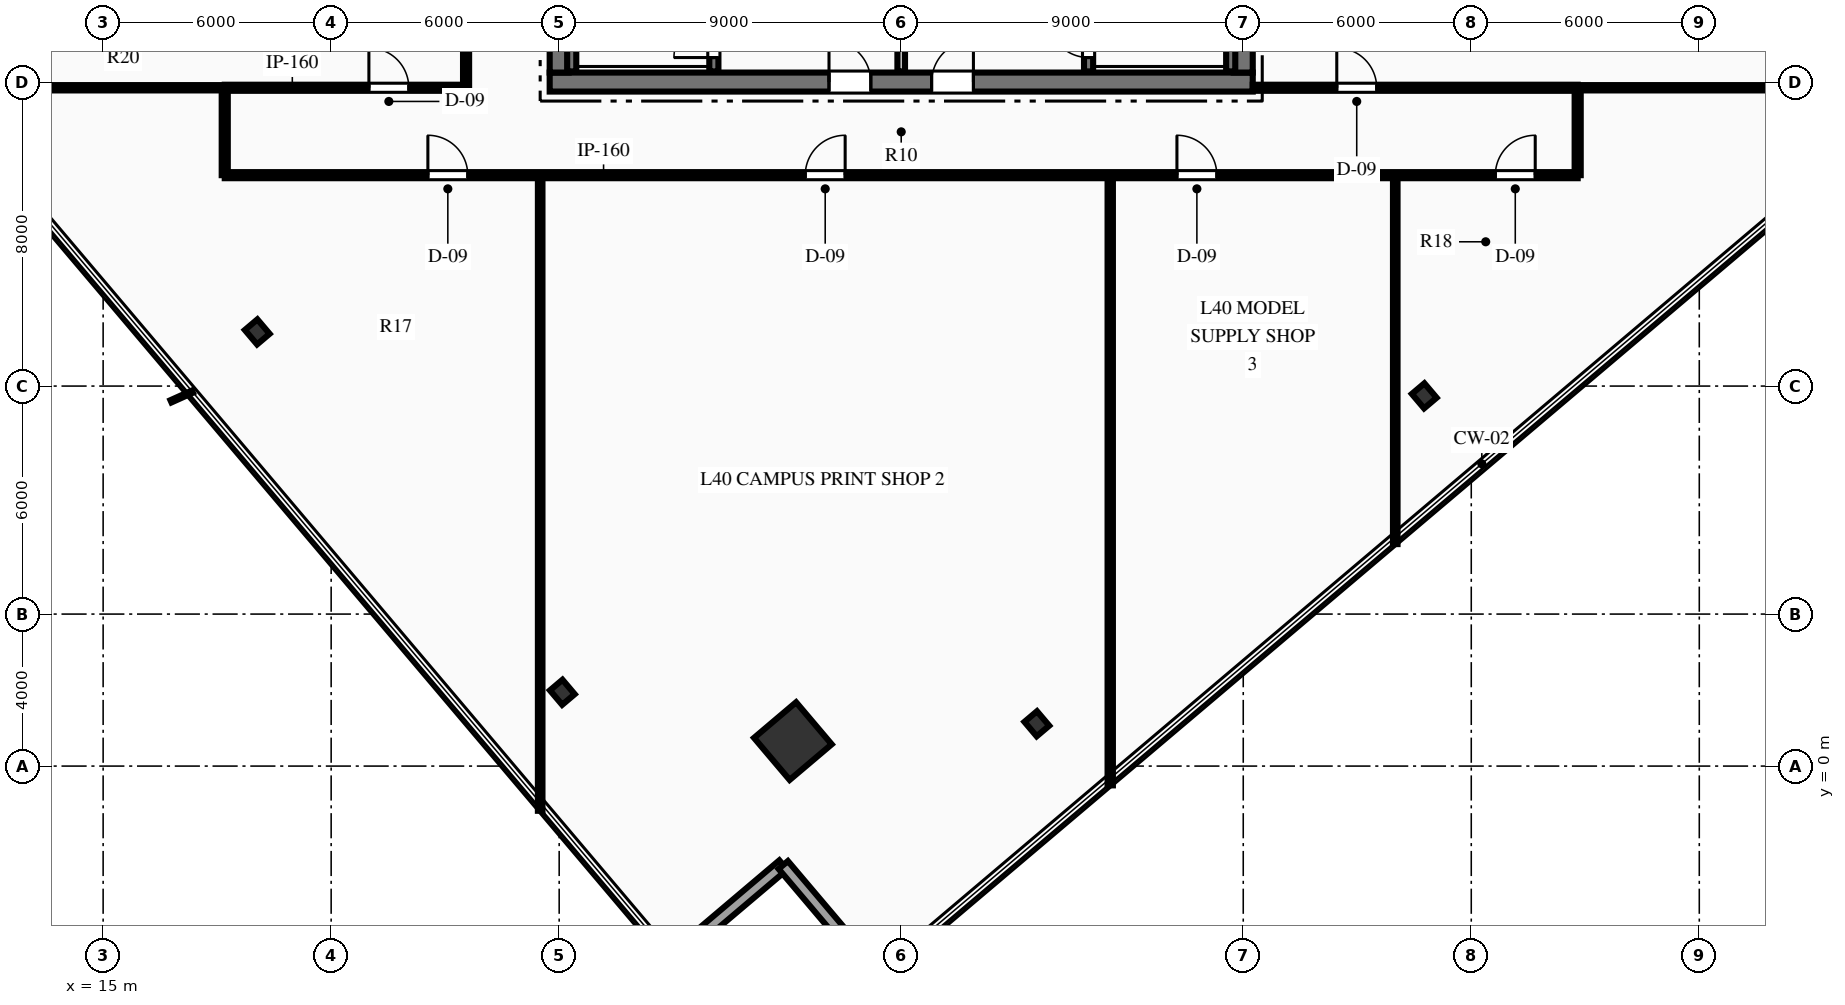
"""IFC4 building model, lengths in metres.
Left out: names, types, materials, properties, quantities, classifications, styles, units other than length and angle.
Written with IfcOpenShell. Run it as: python <this file> out.ifc"""

import sys

from ifc_helpers import new_model, si_unit, direction, frame, frame_2d, origin, origin_2d, place, context, subcontext, project, spatial, rectangle, hollow_rectangle, i_section, extrude, element, fill, save


model = new_model("IFC4")
c1 = context("Model", 3, precision=1e-05, world=origin(), true_north=direction((0.0, 1.0)))
c2 = subcontext(c1, "Body", "Model", "MODEL_VIEW")
j1 = project(units=[si_unit("LENGTHUNIT", "METRE"), si_unit("PLANEANGLEUNIT", "RADIAN")], contexts=[c1])
p1 = place(None, origin())
s1 = spatial("IfcSite", under=j1, at=p1, CompositionType="ELEMENT")
p2 = place(p1, origin())
s2 = spatial("IfcBuilding", under=s1, at=p2, CompositionType="ELEMENT")
p3 = place(p2, frame((0.0, 0.0, 163.2)))
s3 = spatial("IfcBuildingStorey", under=s2, at=p3, CompositionType="ELEMENT", Elevation=163.2)
p4 = place(p3, frame((26.75, 18.0, 0.0), z_axis=(0.0, 0.0, 1.0), x_axis=(1.0, 0.0, 0.0)))
e1 = element("IfcWall", 1, at=p4, inside=s3, PredefinedType="SHEAR", context=c2, shape_type="SweptSolid", body=[
    extrude(rectangle(XDim=18.5, YDim=0.5, at=frame_2d((9.25, 0.0))), origin(), (0.0, 0.0, 1.0), 3.75),
])
p5 = place(p4, frame((7.35, 0.0, 0.0)))
e2 = element("IfcOpeningElement", 2, at=p5, cuts=e1, PredefinedType="OPENING", context=c2, shape_type="SweptSolid", body=[
    extrude(rectangle(XDim=1.1, YDim=2.15, at=frame_2d((0.55, 1.075))), frame((0.0, 0.26, 0.0), z_axis=(0.0, -1.0, 0.0), x_axis=(1.0, 0.0, 0.0)), (0.0, 0.0, 1.0), 0.52),
])
p6 = place(p4, frame((10.05, 0.0, 0.0)))
e3 = element("IfcOpeningElement", 3, at=p6, cuts=e1, PredefinedType="OPENING", context=c2, shape_type="SweptSolid", body=[
    extrude(rectangle(XDim=1.1, YDim=2.15, at=frame_2d((0.55, 1.075))), frame((0.0, 0.26, 0.0), z_axis=(0.0, -1.0, 0.0), x_axis=(1.0, 0.0, 0.0)), (0.0, 0.0, 1.0), 0.52),
])
p7 = place(p3, frame((27.0, 18.25, 0.0), z_axis=(0.0, 0.0, 1.0), x_axis=(0.0, 1.0, 0.0)))
e4 = element("IfcWall", 4, at=p7, inside=s3, PredefinedType="SHEAR", context=c2, shape_type="SweptSolid", body=[
    extrude(rectangle(XDim=15.5, YDim=0.5, at=frame_2d((7.75, 0.0))), origin(), (0.0, 0.0, 1.0), 3.75),
])
p8 = place(p7, frame((9.99, 0.0, 0.0)))
e5 = element("IfcOpeningElement", 5, at=p8, cuts=e4, PredefinedType="OPENING", context=c2, shape_type="SweptSolid", body=[
    extrude(rectangle(XDim=1.4, YDim=2.2, at=frame_2d((0.7, 1.1))), frame((0.0, 0.26, 0.0), z_axis=(0.0, -1.0, 0.0), x_axis=(1.0, 0.0, 0.0)), (0.0, 0.0, 1.0), 0.52),
])
p9 = place(p3, frame((45.0, 18.25, 0.0), z_axis=(0.0, 0.0, 1.0), x_axis=(0.0, 1.0, 0.0)))
e6 = element("IfcWall", 6, at=p9, inside=s3, PredefinedType="SHEAR", context=c2, shape_type="SweptSolid", body=[
    extrude(rectangle(XDim=15.5, YDim=0.5, at=frame_2d((7.75, 0.0))), origin(), (0.0, 0.0, 1.0), 3.75),
])
p10 = place(p9, frame((9.99, 0.0, 0.0)))
e7 = element("IfcOpeningElement", 7, at=p10, cuts=e6, PredefinedType="OPENING", context=c2, shape_type="SweptSolid", body=[
    extrude(rectangle(XDim=1.4, YDim=2.2, at=frame_2d((0.7, 1.1))), frame((0.0, 0.26, 0.0), z_axis=(0.0, -1.0, 0.0), x_axis=(1.0, 0.0, 0.0)), (0.0, 0.0, 1.0), 0.52),
])
p11 = place(p3, frame((31.07, 18.28, 0.0), z_axis=(0.0, 0.0, 1.0), x_axis=(0.0, 1.0, 0.0)))
e8 = element("IfcWall", 8, at=p11, inside=s3, PredefinedType="SHEAR", context=c2, shape_type="SweptSolid", body=[
    extrude(rectangle(XDim=8.26, YDim=0.24, at=frame_2d((4.13, 0.0))), origin(), (0.0, 0.0, 1.0), 3.75),
])
p12 = place(p11, frame((0.365, 0.0, 0.0)))
e9 = element("IfcOpeningElement", 9, at=p12, cuts=e8, PredefinedType="OPENING", context=c2, shape_type="SweptSolid", body=[
    extrude(rectangle(XDim=1.05, YDim=2.15, at=frame_2d((0.525, 1.075))), frame((0.0, 0.13, 0.0), z_axis=(0.0, -1.0, 0.0), x_axis=(1.0, 0.0, 0.0)), (0.0, 0.0, 1.0), 0.26),
])
p13 = place(p3, frame((27.33, 18.28, 0.0), z_axis=(0.0, 0.0, 1.0), x_axis=(0.0, 1.0, 0.0)))
e10 = element("IfcWall", 10, at=p13, inside=s3, PredefinedType="SHEAR", context=c2, shape_type="SweptSolid", body=[
    extrude(rectangle(XDim=8.26, YDim=0.24, at=frame_2d((4.13, 0.0))), origin(), (0.0, 0.0, 1.0), 3.75),
])
p14 = place(p3, frame((40.93, 18.28, 0.0), z_axis=(0.0, 0.0, 1.0), x_axis=(0.0, 1.0, 0.0)))
e11 = element("IfcWall", 11, at=p14, inside=s3, PredefinedType="SHEAR", context=c2, shape_type="SweptSolid", body=[
    extrude(rectangle(XDim=8.26, YDim=0.24, at=frame_2d((4.13, 0.0))), origin(), (0.0, 0.0, 1.0), 3.75),
])
p15 = place(p14, frame((0.365, 0.0, 0.0)))
e12 = element("IfcOpeningElement", 12, at=p15, cuts=e11, PredefinedType="OPENING", context=c2, shape_type="SweptSolid", body=[
    extrude(rectangle(XDim=1.05, YDim=2.15, at=frame_2d((0.525, 1.075))), frame((0.0, 0.13, 0.0), z_axis=(0.0, -1.0, 0.0), x_axis=(1.0, 0.0, 0.0)), (0.0, 0.0, 1.0), 0.26),
])
p16 = place(p3, frame((44.67, 18.28, 0.0), z_axis=(0.0, 0.0, 1.0), x_axis=(0.0, 1.0, 0.0)))
e13 = element("IfcWall", 13, at=p16, inside=s3, PredefinedType="SHEAR", context=c2, shape_type="SweptSolid", body=[
    extrude(rectangle(XDim=8.26, YDim=0.24, at=frame_2d((4.13, 0.0))), origin(), (0.0, 0.0, 1.0), 3.75),
])
p17 = place(p3, frame((33.149, 0.658, 0.0), z_axis=(0.0, 0.0, 1.0), x_axis=(0.763232469783, 0.646123979643, 0.0)))
e14 = element("IfcColumn", 14, at=p17, inside=s3, PredefinedType="COLUMN", context=c2, shape_type="SweptSolid", body=[
    extrude(hollow_rectangle(XDim=1.45, YDim=1.45, WallThickness=0.07, at=origin_2d()), origin(), (0.0, 0.0, 1.0), 3.75),
])
for number, where, z_axis, x_axis in (
    (15, (39.569, 1.114, 0.0), (0.0, 0.0, 1.0), (0.763, 0.646, 0.0)),
    (16, (49.762, 9.743, 0.0), (0.0, 0.0, 1.0), (0.763, 0.646, 0.0)),
    (17, (19.055, 11.426, 0.0), (0.0, 0.0, 1.0), (0.763, 0.646, 0.0)),
    (18, (27.083, 1.942, 0.0), (0.0, 0.0, 1.0), (0.763, 0.646, 0.0)),
):
    element("IfcColumn", number, at=place(p3, frame(where, z_axis=z_axis, x_axis=x_axis)), inside=s3, PredefinedType="COLUMN", context=c2, shape_type="SweptSolid", body=[
        extrude(i_section(OverallWidth=0.432, OverallDepth=0.498, WebThickness=0.056, FlangeThickness=0.089, at=origin_2d()), origin(), (0.0, 0.0, 1.0), 3.75),
    ])
for number, where, z_axis, x_axis in (
    (19, (32.896, -2.603, 0.0), (0.0, 0.0, 1.0), (-0.763, -0.646, 0.0)),
    (20, (35.48, -5.656, 0.0), (0.0, 0.0, 1.0), (-0.646, 0.763, 0.0)),
):
    element("IfcWall", number, at=place(p3, frame(where, z_axis=z_axis, x_axis=x_axis)), inside=s3, PredefinedType="STANDARD", context=c2, shape_type="SweptSolid", body=[
        extrude(rectangle(XDim=4.0, YDim=0.32, at=frame_2d((2.0, 0.0))), origin(), (0.0, 0.0, 1.0), 3.46),
    ])
p18 = place(p3, frame((36.0, 18.28, 0.0), z_axis=(0.0, 0.0, 1.0), x_axis=(0.0, 1.0, 0.0)))
e21 = element("IfcWall", 21, at=p18, inside=s3, PredefinedType="PARTITIONING", context=c2, shape_type="SweptSolid", body=[
    extrude(rectangle(XDim=3.77, YDim=0.2, at=frame_2d((1.885, 0.0))), origin(), (0.0, 0.0, 1.0), 3.46),
])
p19 = place(p3, frame((18.2, 15.55, 0.0), z_axis=(0.0, 0.0, 1.0), x_axis=(1.0, 0.0, 0.0)))
e22 = element("IfcWall", 22, at=p19, inside=s3, PredefinedType="PARTITIONING", context=c2, shape_type="SweptSolid", body=[
    extrude(rectangle(XDim=35.6, YDim=0.16, at=frame_2d((17.8, 0.0))), origin(), (0.0, 0.0, 1.0), 3.46),
])
p20 = place(p19, frame((5.345, 0.0, 0.0)))
e23 = element("IfcOpeningElement", 23, at=p20, cuts=e22, PredefinedType="OPENING", context=c2, shape_type="SweptSolid", body=[
    extrude(rectangle(XDim=1.05, YDim=2.15, at=frame_2d((0.525, 1.075))), frame((0.0, 0.09, 0.0), z_axis=(0.0, -1.0, 0.0), x_axis=(1.0, 0.0, 0.0)), (0.0, 0.0, 1.0), 0.18),
])
p21 = place(p19, frame((15.275, 0.0, 0.0)))
e24 = element("IfcOpeningElement", 24, at=p21, cuts=e22, PredefinedType="OPENING", context=c2, shape_type="SweptSolid", body=[
    extrude(rectangle(XDim=1.05, YDim=2.15, at=frame_2d((0.525, 1.075))), frame((0.0, 0.09, 0.0), z_axis=(0.0, -1.0, 0.0), x_axis=(1.0, 0.0, 0.0)), (0.0, 0.0, 1.0), 0.18),
])
p22 = place(p19, frame((25.055, 0.0, 0.0)))
e25 = element("IfcOpeningElement", 25, at=p22, cuts=e22, PredefinedType="OPENING", context=c2, shape_type="SweptSolid", body=[
    extrude(rectangle(XDim=1.05, YDim=2.15, at=frame_2d((0.525, 1.075))), frame((0.0, 0.09, 0.0), z_axis=(0.0, -1.0, 0.0), x_axis=(1.0, 0.0, 0.0)), (0.0, 0.0, 1.0), 0.18),
])
p23 = place(p19, frame((33.433, 0.0, 0.0)))
e26 = element("IfcOpeningElement", 26, at=p23, cuts=e22, PredefinedType="OPENING", context=c2, shape_type="SweptSolid", body=[
    extrude(rectangle(XDim=1.05, YDim=2.15, at=frame_2d((0.525, 1.075))), frame((0.0, 0.09, 0.0), z_axis=(0.0, -1.0, 0.0), x_axis=(1.0, 0.0, 0.0)), (0.0, 0.0, 1.0), 0.18),
])
p24 = place(p3, frame((18.2, 17.85, 0.0), z_axis=(0.0, 0.0, 1.0), x_axis=(1.0, 0.0, 0.0)))
e27 = element("IfcWall", 27, at=p24, inside=s3, PredefinedType="PARTITIONING", context=c2, shape_type="SweptSolid", body=[
    extrude(rectangle(XDim=6.35, YDim=0.16, at=frame_2d((3.175, 0.0))), origin(), (0.0, 0.0, 1.0), 3.46),
])
p25 = place(p24, frame((3.793, 0.0, 0.0)))
e28 = element("IfcOpeningElement", 28, at=p25, cuts=e27, PredefinedType="OPENING", context=c2, shape_type="SweptSolid", body=[
    extrude(rectangle(XDim=1.05, YDim=2.15, at=frame_2d((0.525, 1.075))), frame((0.0, 0.09, 0.0), z_axis=(0.0, -1.0, 0.0), x_axis=(1.0, 0.0, 0.0)), (0.0, 0.0, 1.0), 0.18),
])
p26 = place(p3, frame((45.25, 17.85, 0.0), z_axis=(0.0, 0.0, 1.0), x_axis=(1.0, 0.0, 0.0)))
e29 = element("IfcWall", 29, at=p26, inside=s3, PredefinedType="PARTITIONING", context=c2, shape_type="SweptSolid", body=[
    extrude(rectangle(XDim=8.55, YDim=0.16, at=frame_2d((4.275, 0.0))), origin(), (0.0, 0.0, 1.0), 2.839),
])
p27 = place(p26, frame((2.211, 0.0, 0.0)))
e30 = element("IfcOpeningElement", 30, at=p27, cuts=e29, PredefinedType="OPENING", context=c2, shape_type="SweptSolid", body=[
    extrude(rectangle(XDim=1.05, YDim=2.15, at=frame_2d((0.525, 1.075))), frame((0.0, 0.09, 0.0), z_axis=(0.0, -1.0, 0.0), x_axis=(1.0, 0.0, 0.0)), (0.0, 0.0, 1.0), 0.18),
])
p28 = place(p3, frame((24.55, 17.85, 0.0), z_axis=(0.0, 0.0, 1.0), x_axis=(0.0, 1.0, 0.0)))
e31 = element("IfcWall", 31, at=p28, inside=s3, PredefinedType="PARTITIONING", context=c2, shape_type="SweptSolid", body=[
    extrude(rectangle(XDim=16.3, YDim=0.16, at=frame_2d((8.15, 0.0))), origin(), (0.0, 0.0, 1.0), 3.46),
])
p29 = place(p28, frame((6.491, 0.0, 0.0)))
e32 = element("IfcOpeningElement", 32, at=p29, cuts=e31, PredefinedType="OPENING", context=c2, shape_type="SweptSolid", body=[
    extrude(rectangle(XDim=1.05, YDim=2.15, at=frame_2d((0.525, 1.075))), frame((0.0, 0.09, 0.0), z_axis=(0.0, -1.0, 0.0), x_axis=(1.0, 0.0, 0.0)), (0.0, 0.0, 1.0), 0.18),
])
p30 = place(p28, frame((9.777, 0.0, 0.0)))
e33 = element("IfcOpeningElement", 33, at=p30, cuts=e31, PredefinedType="OPENING", context=c2, shape_type="SweptSolid", body=[
    extrude(rectangle(XDim=1.05, YDim=2.15, at=frame_2d((0.525, 1.075))), frame((0.0, 0.09, 0.0), z_axis=(0.0, -1.0, 0.0), x_axis=(1.0, 0.0, 0.0)), (0.0, 0.0, 1.0), 0.18),
])
for number, where, z_axis, x_axis in (
    (34, (18.2, 15.55, 0.0), (0.0, 0.0, 1.0), (0.0, 1.0, 0.0)),
    (35, (53.8, 15.55, 0.0), (0.0, 0.0, 1.0), (0.0, 1.0, 0.0)),
):
    element("IfcWall", number, at=place(p3, frame(where, z_axis=z_axis, x_axis=x_axis)), inside=s3, PredefinedType="PARTITIONING", context=c2, shape_type="SweptSolid", body=[
        extrude(rectangle(XDim=2.3, YDim=0.16, at=frame_2d((1.15, 0.0))), origin(), (0.0, 0.0, 1.0), 3.46),
    ])
p31 = place(p3, frame((10.393, 17.85, 0.0), z_axis=(0.0, 0.0, 1.0), x_axis=(1.0, 0.0, 0.0)))
e36 = element("IfcWall", 36, at=p31, inside=s3, PredefinedType="PARTITIONING", context=c2, shape_type="SweptSolid", body=[
    extrude(rectangle(XDim=7.807, YDim=0.14, at=frame_2d((3.903, 0.0))), origin(), (0.0, 0.0, 1.0), 3.46),
])
p32 = place(p3, frame((53.8, 17.85, 0.0), z_axis=(0.0, 0.0, 1.0), x_axis=(1.0, 0.0, 0.0)))
e37 = element("IfcWall", 37, at=p32, inside=s3, PredefinedType="PARTITIONING", context=c2, shape_type="SweptSolid", body=[
    extrude(rectangle(XDim=9.385, YDim=0.14, at=frame_2d((4.692, 0.0))), origin(), (0.0, 0.0, 1.0), 2.839),
])
p33 = place(p3, frame((26.5, -1.177, 0.0), z_axis=(0.0, 0.0, 1.0), x_axis=(0.0, 1.0, 0.0)))
e38 = element("IfcWall", 38, at=p33, inside=s3, PredefinedType="PARTITIONING", context=c2, shape_type="SweptSolid", body=[
    extrude(rectangle(XDim=16.727, YDim=0.12, at=frame_2d((8.363, 0.0))), origin(), (0.0, 0.0, 1.0), 3.46),
])
p34 = place(p3, frame((41.5, -0.507, 0.0), z_axis=(0.0, 0.0, 1.0), x_axis=(0.0, 1.0, 0.0)))
e39 = element("IfcWall", 39, at=p34, inside=s3, PredefinedType="PARTITIONING", context=c2, shape_type="SweptSolid", body=[
    extrude(rectangle(XDim=16.057, YDim=0.14, at=frame_2d((8.029, 0.0))), origin(), (0.0, 0.0, 1.0), 3.46),
])
p35 = place(p3, frame((49.0, 5.842, 0.0), z_axis=(0.0, 0.0, 1.0), x_axis=(0.0, 1.0, 0.0)))
e40 = element("IfcWall", 40, at=p35, inside=s3, PredefinedType="PARTITIONING", context=c2, shape_type="SweptSolid", body=[
    extrude(rectangle(XDim=9.708, YDim=0.12, at=frame_2d((4.854, 0.0))), origin(), (0.0, 0.0, 1.0), 3.46),
])
p36 = place(p12, origin())
e41 = element("IfcDoor", 41, at=p36, inside=s3, OperationType="SINGLE_SWING_LEFT", PredefinedType="DOOR", context=c2, shape_type="SweptSolid", body=[
    extrude(rectangle(XDim=1.05, YDim=2.15, at=frame_2d((0.525, 1.075))), frame((0.0, 0.025, 0.0), z_axis=(0.0, -1.0, 0.0), x_axis=(1.0, 0.0, 0.0)), (0.0, 0.0, 1.0), 0.05),
])
fill(e9, e41)
p37 = place(p15, origin())
e42 = element("IfcDoor", 42, at=p37, inside=s3, OperationType="SINGLE_SWING_RIGHT", PredefinedType="DOOR", context=c2, shape_type="SweptSolid", body=[
    extrude(rectangle(XDim=1.05, YDim=2.15, at=frame_2d((0.525, 1.075))), frame((0.0, 0.025, 0.0), z_axis=(0.0, -1.0, 0.0), x_axis=(1.0, 0.0, 0.0)), (0.0, 0.0, 1.0), 0.05),
])
fill(e12, e42)
p38 = place(p5, origin())
e43 = element("IfcDoor", 43, at=p38, inside=s3, OperationType="SINGLE_SWING_LEFT", PredefinedType="DOOR", context=c2, shape_type="SweptSolid", body=[
    extrude(rectangle(XDim=1.1, YDim=2.15, at=frame_2d((0.55, 1.075))), frame((0.0, 0.025, 0.0), z_axis=(0.0, -1.0, 0.0), x_axis=(1.0, 0.0, 0.0)), (0.0, 0.0, 1.0), 0.05),
])
fill(e2, e43)
p39 = place(p6, origin())
e44 = element("IfcDoor", 44, at=p39, inside=s3, OperationType="SINGLE_SWING_RIGHT", PredefinedType="DOOR", context=c2, shape_type="SweptSolid", body=[
    extrude(rectangle(XDim=1.1, YDim=2.15, at=frame_2d((0.55, 1.075))), frame((0.0, 0.025, 0.0), z_axis=(0.0, -1.0, 0.0), x_axis=(1.0, 0.0, 0.0)), (0.0, 0.0, 1.0), 0.05),
])
fill(e3, e44)
p40 = place(p20, origin())
e45 = element("IfcDoor", 45, at=p40, inside=s3, OperationType="SINGLE_SWING_LEFT", PredefinedType="DOOR", context=c2, shape_type="SweptSolid", body=[
    extrude(rectangle(XDim=1.05, YDim=2.15, at=frame_2d((0.525, 1.075))), frame((0.0, 0.025, 0.0), z_axis=(0.0, -1.0, 0.0), x_axis=(1.0, 0.0, 0.0)), (0.0, 0.0, 1.0), 0.05),
])
fill(e23, e45)
p41 = place(p21, origin())
e46 = element("IfcDoor", 46, at=p41, inside=s3, OperationType="SINGLE_SWING_RIGHT", PredefinedType="DOOR", context=c2, shape_type="SweptSolid", body=[
    extrude(rectangle(XDim=1.05, YDim=2.15, at=frame_2d((0.525, 1.075))), frame((0.0, 0.025, 0.0), z_axis=(0.0, -1.0, 0.0), x_axis=(1.0, 0.0, 0.0)), (0.0, 0.0, 1.0), 0.05),
])
fill(e24, e46)
p42 = place(p22, origin())
e47 = element("IfcDoor", 47, at=p42, inside=s3, OperationType="SINGLE_SWING_LEFT", PredefinedType="DOOR", context=c2, shape_type="SweptSolid", body=[
    extrude(rectangle(XDim=1.05, YDim=2.15, at=frame_2d((0.525, 1.075))), frame((0.0, 0.025, 0.0), z_axis=(0.0, -1.0, 0.0), x_axis=(1.0, 0.0, 0.0)), (0.0, 0.0, 1.0), 0.05),
])
fill(e25, e47)
p43 = place(p23, origin())
e48 = element("IfcDoor", 48, at=p43, inside=s3, OperationType="SINGLE_SWING_RIGHT", PredefinedType="DOOR", context=c2, shape_type="SweptSolid", body=[
    extrude(rectangle(XDim=1.05, YDim=2.15, at=frame_2d((0.525, 1.075))), frame((0.0, 0.025, 0.0), z_axis=(0.0, -1.0, 0.0), x_axis=(1.0, 0.0, 0.0)), (0.0, 0.0, 1.0), 0.05),
])
fill(e26, e48)
p44 = place(p25, origin())
e49 = element("IfcDoor", 49, at=p44, inside=s3, OperationType="SINGLE_SWING_LEFT", PredefinedType="DOOR", context=c2, shape_type="SweptSolid", body=[
    extrude(rectangle(XDim=1.05, YDim=2.15, at=frame_2d((0.525, 1.075))), frame((0.0, 0.025, 0.0), z_axis=(0.0, -1.0, 0.0), x_axis=(1.0, 0.0, 0.0)), (0.0, 0.0, 1.0), 0.05),
])
fill(e28, e49)
p45 = place(p27, origin())
e50 = element("IfcDoor", 50, at=p45, inside=s3, OperationType="SINGLE_SWING_LEFT", PredefinedType="DOOR", context=c2, shape_type="SweptSolid", body=[
    extrude(rectangle(XDim=1.05, YDim=2.15, at=frame_2d((0.525, 1.075))), frame((0.0, 0.025, 0.0), z_axis=(0.0, -1.0, 0.0), x_axis=(1.0, 0.0, 0.0)), (0.0, 0.0, 1.0), 0.05),
])
fill(e30, e50)
save(model, sys.argv[1])
